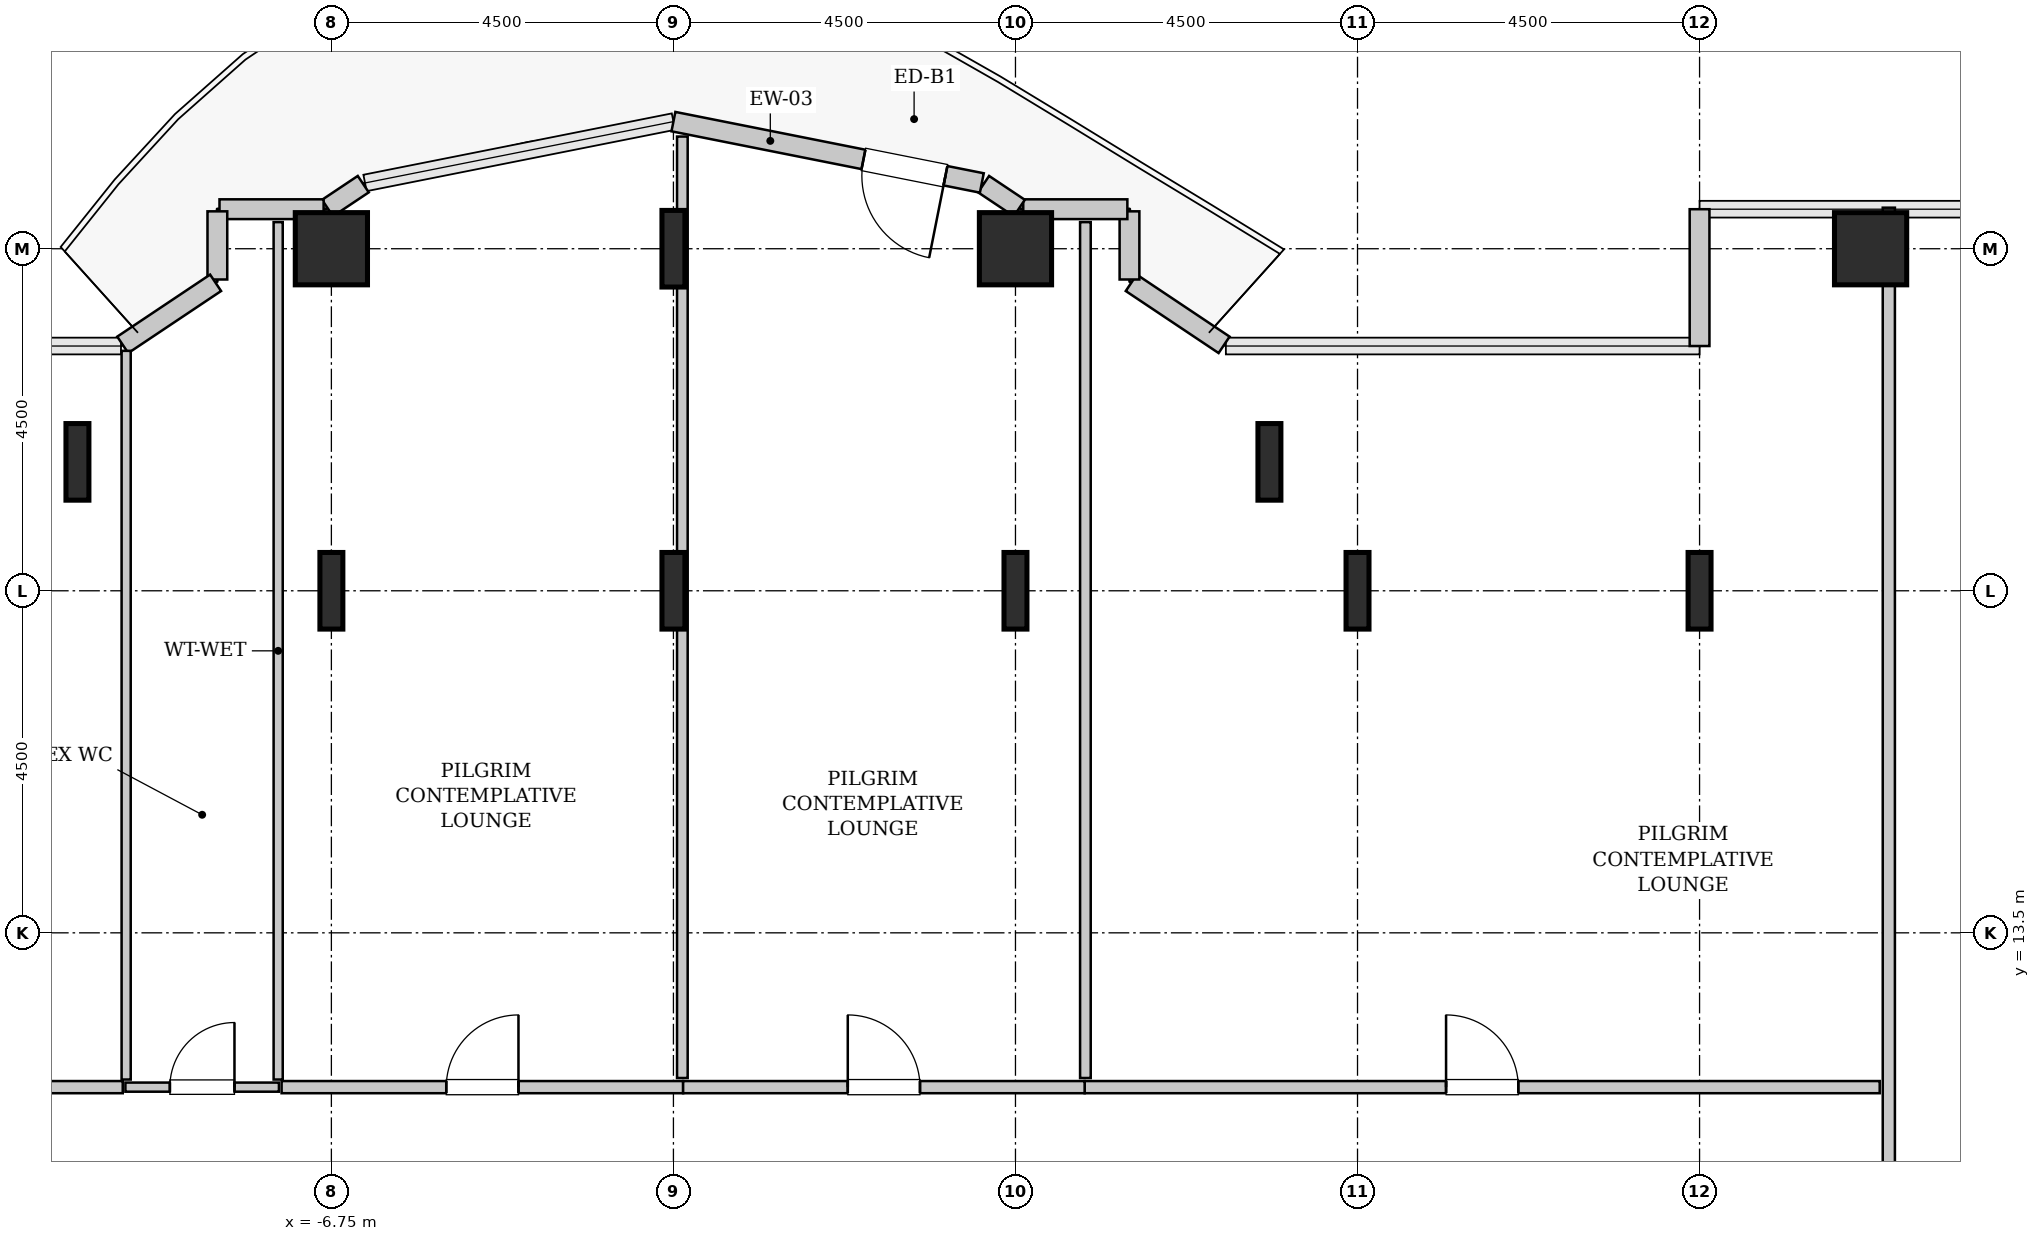
"""IFC4 building model, lengths in metres.
Left out: names, types, materials, properties, quantities, classifications, styles, units other than length and angle.
Written with IfcOpenShell. Run it as: python <this file> out.ifc"""

import sys

from ifc_helpers import new_model, si_unit, direction, frame, frame_2d, origin, origin_2d, place, context, subcontext, project, spatial, rectangle, hollow_rectangle, i_section, extrude, source, transform, mapped, element, fill, save


model = new_model("IFC4")
c1 = context("Model", 3, precision=1e-05, world=origin(), true_north=direction((0.0, 1.0)))
c2 = subcontext(c1, "Body", "Model", "MODEL_VIEW")
j1 = project(units=[si_unit("LENGTHUNIT", "METRE"), si_unit("PLANEANGLEUNIT", "RADIAN")], contexts=[c1])
p1 = place(None, origin())
s1 = spatial("IfcSite", under=j1, at=p1, CompositionType="ELEMENT")
p2 = place(p1, origin())
s2 = spatial("IfcBuilding", under=s1, at=p2, CompositionType="ELEMENT")
p3 = place(p2, frame((0.0, 0.0, 102.2)))
s3 = spatial("IfcBuildingStorey", under=s2, at=p3, CompositionType="ELEMENT", Elevation=102.2)
m1 = source(origin(), c2, "Body", "SweptSolid", [
    extrude(i_section(OverallWidth=0.302, OverallDepth=1.008, WebThickness=0.021, FlangeThickness=0.04, FilletRadius=0.03, at=origin_2d()), origin(), (0.0, 0.0, 1.0), 3.8),
])
for number, where, z_axis, x_axis in (
    (1, (-10.091, 19.696, 0.0), (0.0, 0.0, 1.0), (1.0, 0.0, 0.0)),
    (2, (-6.75, 18.0, 0.0), (0.0, 0.0, 1.0), (1.0, 0.0, 0.0)),
):
    element("IfcColumn", number, at=place(p3, frame(where, z_axis=z_axis, x_axis=x_axis)), inside=s3, PredefinedType="COLUMN", context=c2, shape_type="MappedRepresentation", body=[
        mapped(m1, transform((0.0, 0.0, 0.0), x_axis=(1.0, 0.0, 0.0), y_axis=(0.0, 1.0, 0.0), z_axis=(0.0, 0.0, 1.0), scale=1.0)),
    ])
m2 = source(origin(), c2, "Body", "SweptSolid", [
    extrude(hollow_rectangle(XDim=0.95, YDim=0.95, WallThickness=0.045, InnerFilletRadius=0.045, OuterFilletRadius=0.09, at=origin_2d()), origin(), (0.0, 0.0, 1.0), 3.8),
])
p4 = place(p3, frame((-6.75, 22.5, 0.0), z_axis=(0.0, 0.0, 1.0), x_axis=(1.0, 0.0, 0.0)))
e3 = element("IfcColumn", 3, at=p4, inside=s3, PredefinedType="COLUMN", context=c2, shape_type="MappedRepresentation", body=[
    mapped(m2, transform((0.0, 0.0, 0.0), x_axis=(1.0, 0.0, 0.0), y_axis=(0.0, 1.0, 0.0), z_axis=(0.0, 0.0, 1.0), scale=1.0)),
])
for number, where, z_axis, x_axis in (
    (4, (-2.25, 18.0, 0.0), (0.0, 0.0, 1.0), (1.0, 0.0, 0.0)),
    (5, (-2.25, 22.5, 0.0), (0.0, 0.0, 1.0), (1.0, 0.0, 0.0)),
    (6, (2.25, 18.0, 0.0), (0.0, 0.0, 1.0), (1.0, 0.0, 0.0)),
):
    element("IfcColumn", number, at=place(p3, frame(where, z_axis=z_axis, x_axis=x_axis)), inside=s3, PredefinedType="COLUMN", context=c2, shape_type="MappedRepresentation", body=[
        mapped(m1, transform((0.0, 0.0, 0.0), x_axis=(1.0, 0.0, 0.0), y_axis=(0.0, 1.0, 0.0), z_axis=(0.0, 0.0, 1.0), scale=1.0)),
    ])
p5 = place(p3, frame((2.25, 22.5, 0.0), z_axis=(0.0, 0.0, 1.0), x_axis=(1.0, 0.0, 0.0)))
e7 = element("IfcColumn", 7, at=p5, inside=s3, PredefinedType="COLUMN", context=c2, shape_type="MappedRepresentation", body=[
    mapped(m2, transform((0.0, 0.0, 0.0), x_axis=(1.0, 0.0, 0.0), y_axis=(0.0, 1.0, 0.0), z_axis=(0.0, 0.0, 1.0), scale=1.0)),
])
for number, where, z_axis, x_axis in (
    (8, (5.591, 19.696, 0.0), (0.0, 0.0, 1.0), (1.0, 0.0, 0.0)),
    (9, (6.75, 18.0, 0.0), (0.0, 0.0, 1.0), (1.0, 0.0, 0.0)),
    (10, (11.25, 18.0, 0.0), (0.0, 0.0, 1.0), (1.0, 0.0, 0.0)),
):
    element("IfcColumn", number, at=place(p3, frame(where, z_axis=z_axis, x_axis=x_axis)), inside=s3, PredefinedType="COLUMN", context=c2, shape_type="MappedRepresentation", body=[
        mapped(m1, transform((0.0, 0.0, 0.0), x_axis=(1.0, 0.0, 0.0), y_axis=(0.0, 1.0, 0.0), z_axis=(0.0, 0.0, 1.0), scale=1.0)),
    ])
p6 = place(p3, frame((13.5, 22.5, 0.0), z_axis=(0.0, 0.0, 1.0), x_axis=(1.0, 0.0, 0.0)))
e11 = element("IfcColumn", 11, at=p6, inside=s3, PredefinedType="COLUMN", context=c2, shape_type="MappedRepresentation", body=[
    mapped(m2, transform((0.0, 0.0, 0.0), x_axis=(1.0, 0.0, 0.0), y_axis=(0.0, 1.0, 0.0), z_axis=(0.0, 0.0, 1.0), scale=1.0)),
])
m3 = source(origin(), c2, "Body", "SweptSolid", [
    extrude(rectangle(XDim=1.8, YDim=0.26, at=frame_2d((0.9, 0.0))), origin(), (0.0, 0.0, 1.0), 3.55),
])
p7 = place(p3, frame((11.25, 23.02, 0.0), z_axis=(0.0, 0.0, 1.0), x_axis=(0.0, -1.0, 0.0)))
e12 = element("IfcWall", 12, at=p7, inside=s3, PredefinedType="SOLIDWALL", context=c2, shape_type="MappedRepresentation", body=[
    mapped(m3, transform((0.0, 0.0, 0.0), x_axis=(1.0, 0.0, 0.0), y_axis=(0.0, 1.0, 0.0), z_axis=(0.0, 0.0, 1.0), scale=1.0)),
])
m4 = source(origin(), c2, "Body", "SweptSolid", [
    extrude(rectangle(XDim=1.469, YDim=0.26, at=frame_2d((0.734, 0.0))), origin(), (0.0, 0.0, 1.0), 3.55),
])
p8 = place(p3, frame((4.995, 21.236, 0.0), z_axis=(0.0, 0.0, 1.0), x_axis=(-0.831461760506, 0.555581983884, 0.0)))
e13 = element("IfcWall", 13, at=p8, inside=s3, PredefinedType="SOLIDWALL", context=c2, shape_type="MappedRepresentation", body=[
    mapped(m4, transform((0.0, 0.0, 0.0), x_axis=(1.0, 0.0, 0.0), y_axis=(0.0, 1.0, 0.0), z_axis=(0.0, 0.0, 1.0), scale=1.0)),
])
m5 = source(origin(), c2, "Body", "SweptSolid", [
    extrude(rectangle(XDim=0.897, YDim=0.26, at=frame_2d((0.448, 0.0))), origin(), (0.0, 0.0, 1.0), 3.55),
])
p9 = place(p3, frame((3.75, 22.095, 0.0), z_axis=(0.0, 0.0, 1.0), x_axis=(0.0, 1.0, 0.0)))
e14 = element("IfcWall", 14, at=p9, inside=s3, PredefinedType="SOLIDWALL", context=c2, shape_type="MappedRepresentation", body=[
    mapped(m5, transform((0.0, 0.0, 0.0), x_axis=(1.0, 0.0, 0.0), y_axis=(0.0, 1.0, 0.0), z_axis=(0.0, 0.0, 1.0), scale=1.0)),
])
m6 = source(origin(), c2, "Body", "SweptSolid", [
    extrude(rectangle(XDim=1.37, YDim=0.26, at=frame_2d((0.685, 0.0))), origin(), (0.0, 0.0, 1.0), 3.55),
])
p10 = place(p3, frame((3.722, 23.02, 0.0), z_axis=(0.0, 0.0, 1.0), x_axis=(-1.0, 0.0, 0.0)))
e15 = element("IfcWall", 15, at=p10, inside=s3, PredefinedType="SOLIDWALL", context=c2, shape_type="MappedRepresentation", body=[
    mapped(m6, transform((0.0, 0.0, 0.0), x_axis=(1.0, 0.0, 0.0), y_axis=(0.0, 1.0, 0.0), z_axis=(0.0, 0.0, 1.0), scale=1.0)),
])
m7 = source(origin(), c2, "Body", "SweptSolid", [
    extrude(rectangle(XDim=0.565, YDim=0.26, at=frame_2d((0.283, 0.0))), origin(), (0.0, 0.0, 1.0), 3.55),
])
p11 = place(p3, frame((2.301, 23.036, 0.0), z_axis=(0.0, 0.0, 1.0), x_axis=(-0.831651492666, 0.555297933317, 0.0)))
e16 = element("IfcWall", 16, at=p11, inside=s3, PredefinedType="SOLIDWALL", context=c2, shape_type="MappedRepresentation", body=[
    mapped(m7, transform((0.0, 0.0, 0.0), x_axis=(1.0, 0.0, 0.0), y_axis=(0.0, 1.0, 0.0), z_axis=(0.0, 0.0, 1.0), scale=1.0)),
])
m8 = source(origin(), c2, "Body", "SweptSolid", [
    extrude(rectangle(XDim=4.137, YDim=0.26, at=frame_2d((2.068, 0.0))), origin(), (0.0, 0.0, 1.0), 3.55),
])
p12 = place(p3, frame((1.807, 23.365, 0.0), z_axis=(0.0, 0.0, 1.0), x_axis=(-0.980782170794, 0.195105954428, 0.0)))
e17 = element("IfcWall", 17, at=p12, inside=s3, PredefinedType="SOLIDWALL", context=c2, shape_type="MappedRepresentation", body=[
    mapped(m8, transform((0.0, 0.0, 0.0), x_axis=(1.0, 0.0, 0.0), y_axis=(0.0, 1.0, 0.0), z_axis=(0.0, 0.0, 1.0), scale=1.0)),
])
p13 = place(p12, frame((0.488, 0.0, 0.0)))
e18 = element("IfcOpeningElement", 18, at=p13, cuts=e17, PredefinedType="OPENING", context=c2, shape_type="SweptSolid", body=[
    extrude(rectangle(XDim=1.1, YDim=2.2, at=frame_2d((0.55, 1.1))), frame((0.0, 0.14, 0.0), z_axis=(0.0, -1.0, 0.0), x_axis=(1.0, 0.0, 0.0)), (0.0, 0.0, 1.0), 0.28),
])
p14 = place(p3, frame((-6.331, 23.35, 0.0), z_axis=(0.0, 0.0, 1.0), x_axis=(-0.831651492666, -0.555297933317, 0.0)))
e19 = element("IfcWall", 19, at=p14, inside=s3, PredefinedType="SOLIDWALL", context=c2, shape_type="MappedRepresentation", body=[
    mapped(m7, transform((0.0, 0.0, 0.0), x_axis=(1.0, 0.0, 0.0), y_axis=(0.0, 1.0, 0.0), z_axis=(0.0, 0.0, 1.0), scale=1.0)),
])
p15 = place(p3, frame((-6.852, 23.02, 0.0), z_axis=(0.0, 0.0, 1.0), x_axis=(-1.0, 0.0, 0.0)))
e20 = element("IfcWall", 20, at=p15, inside=s3, PredefinedType="SOLIDWALL", context=c2, shape_type="MappedRepresentation", body=[
    mapped(m6, transform((0.0, 0.0, 0.0), x_axis=(1.0, 0.0, 0.0), y_axis=(0.0, 1.0, 0.0), z_axis=(0.0, 0.0, 1.0), scale=1.0)),
])
p16 = place(p3, frame((-8.25, 22.992, 0.0), z_axis=(0.0, 0.0, 1.0), x_axis=(0.0, -1.0, 0.0)))
e21 = element("IfcWall", 21, at=p16, inside=s3, PredefinedType="SOLIDWALL", context=c2, shape_type="MappedRepresentation", body=[
    mapped(m5, transform((0.0, 0.0, 0.0), x_axis=(1.0, 0.0, 0.0), y_axis=(0.0, 1.0, 0.0), z_axis=(0.0, 0.0, 1.0), scale=1.0)),
])
p17 = place(p3, frame((-8.273, 22.052, 0.0), z_axis=(0.0, 0.0, 1.0), x_axis=(-0.831461760506, -0.555581983884, 0.0)))
e22 = element("IfcWall", 22, at=p17, inside=s3, PredefinedType="SOLIDWALL", context=c2, shape_type="MappedRepresentation", body=[
    mapped(m4, transform((0.0, 0.0, 0.0), x_axis=(1.0, 0.0, 0.0), y_axis=(0.0, 1.0, 0.0), z_axis=(0.0, 0.0, 1.0), scale=1.0)),
])
m9 = source(origin(), c2, "Body", "SweptSolid", [
    extrude(rectangle(XDim=2.02, YDim=0.12, at=frame_2d((1.01, 0.0))), origin(), (0.0, 0.0, 1.0), 3.535),
])
p18 = place(p3, frame((-9.46, 11.47, 0.0), z_axis=(0.0, 0.0, 1.0), x_axis=(1.0, 0.0, 0.0)))
e23 = element("IfcWall", 23, at=p18, inside=s3, PredefinedType="PLUMBINGWALL", context=c2, shape_type="MappedRepresentation", body=[
    mapped(m9, transform((0.0, 0.0, 0.0), x_axis=(1.0, 0.0, 0.0), y_axis=(0.0, 1.0, 0.0), z_axis=(0.0, 0.0, 1.0), scale=1.0)),
])
p19 = place(p18, frame((0.585, 0.0, 0.0)))
e24 = element("IfcOpeningElement", 24, at=p19, cuts=e23, PredefinedType="OPENING", context=c2, shape_type="SweptSolid", body=[
    extrude(rectangle(XDim=0.85, YDim=2.1, at=frame_2d((0.425, 1.05))), frame((0.0, 0.07, 0.0), z_axis=(0.0, -1.0, 0.0), x_axis=(1.0, 0.0, 0.0)), (0.0, 0.0, 1.0), 0.14),
])
m10 = source(origin(), c2, "Body", "SweptSolid", [
    extrude(rectangle(XDim=11.28, YDim=0.12, at=frame_2d((5.64, 0.0))), origin(), (0.0, 0.0, 1.0), 3.535),
])
p20 = place(p3, frame((-7.45, 11.57, 0.0), z_axis=(0.0, 0.0, 1.0), x_axis=(0.0, 1.0, 0.0)))
e25 = element("IfcWall", 25, at=p20, inside=s3, PredefinedType="PLUMBINGWALL", context=c2, shape_type="MappedRepresentation", body=[
    mapped(m10, transform((0.0, 0.0, 0.0), x_axis=(1.0, 0.0, 0.0), y_axis=(0.0, 1.0, 0.0), z_axis=(0.0, 0.0, 1.0), scale=1.0)),
])
m11 = source(origin(), c2, "Body", "SweptSolid", [
    extrude(rectangle(XDim=9.587, YDim=0.12, at=frame_2d((4.793, 0.0))), origin(), (0.0, 0.0, 1.0), 3.535),
])
p21 = place(p3, frame((-9.45, 11.57, 0.0), z_axis=(0.0, 0.0, 1.0), x_axis=(0.0, 1.0, 0.0)))
e26 = element("IfcWall", 26, at=p21, inside=s3, PredefinedType="PLUMBINGWALL", context=c2, shape_type="MappedRepresentation", body=[
    mapped(m11, transform((0.0, 0.0, 0.0), x_axis=(1.0, 0.0, 0.0), y_axis=(0.0, 1.0, 0.0), z_axis=(0.0, 0.0, 1.0), scale=1.0)),
])
m12 = source(origin(), c2, "Body", "SweptSolid", [
    extrude(rectangle(XDim=19.445, YDim=0.16, at=frame_2d((9.723, 0.0))), origin(), (0.0, 0.0, 1.0), 3.535),
])
p22 = place(p3, frame((13.74, 3.595, 0.0), z_axis=(0.0, 0.0, 1.0), x_axis=(0.0, 1.0, 0.0)))
e27 = element("IfcWall", 27, at=p22, inside=s3, PredefinedType="PARTITIONING", context=c2, shape_type="MappedRepresentation", body=[
    mapped(m12, transform((0.0, 0.0, 0.0), x_axis=(1.0, 0.0, 0.0), y_axis=(0.0, 1.0, 0.0), z_axis=(0.0, 0.0, 1.0), scale=1.0)),
])
p23 = place(p22, frame((3.482, 0.0, 0.0)))
e28 = element("IfcOpeningElement", 28, at=p23, cuts=e27, PredefinedType="OPENING", context=c2, shape_type="SweptSolid", body=[
    extrude(rectangle(XDim=0.95, YDim=2.1, at=frame_2d((0.475, 1.05))), frame((0.0, 0.09, 0.0), z_axis=(0.0, -1.0, 0.0), x_axis=(1.0, 0.0, 0.0)), (0.0, 0.0, 1.0), 0.18),
])
m13 = source(origin(), c2, "Body", "SweptSolid", [
    extrude(rectangle(XDim=4.125, YDim=0.16, at=frame_2d((2.062, 0.0))), origin(), (0.0, 0.0, 1.0), 3.535),
])
p24 = place(p3, frame((-13.62, 11.47, 0.0), z_axis=(0.0, 0.0, 1.0), x_axis=(1.0, 0.0, 0.0)))
e29 = element("IfcWall", 29, at=p24, inside=s3, PredefinedType="PARTITIONING", context=c2, shape_type="MappedRepresentation", body=[
    mapped(m13, transform((0.0, 0.0, 0.0), x_axis=(1.0, 0.0, 0.0), y_axis=(0.0, 1.0, 0.0), z_axis=(0.0, 0.0, 1.0), scale=1.0)),
])
p25 = place(p24, frame((1.587, 0.0, 0.0)))
e30 = element("IfcOpeningElement", 30, at=p25, cuts=e29, PredefinedType="OPENING", context=c2, shape_type="SweptSolid", body=[
    extrude(rectangle(XDim=0.95, YDim=2.1, at=frame_2d((0.475, 1.05))), frame((0.0, 0.09, 0.0), z_axis=(0.0, -1.0, 0.0), x_axis=(1.0, 0.0, 0.0)), (0.0, 0.0, 1.0), 0.18),
])
m14 = source(origin(), c2, "Body", "SweptSolid", [
    extrude(rectangle(XDim=10.46, YDim=0.16, at=frame_2d((5.23, 0.0))), origin(), (0.0, 0.0, 1.0), 3.535),
])
p26 = place(p3, frame((3.16, 11.47, 0.0), z_axis=(0.0, 0.0, 1.0), x_axis=(1.0, 0.0, 0.0)))
e31 = element("IfcWall", 31, at=p26, inside=s3, PredefinedType="PARTITIONING", context=c2, shape_type="MappedRepresentation", body=[
    mapped(m14, transform((0.0, 0.0, 0.0), x_axis=(1.0, 0.0, 0.0), y_axis=(0.0, 1.0, 0.0), z_axis=(0.0, 0.0, 1.0), scale=1.0)),
])
p27 = place(p26, frame((4.755, 0.0, 0.0)))
e32 = element("IfcOpeningElement", 32, at=p27, cuts=e31, PredefinedType="OPENING", context=c2, shape_type="SweptSolid", body=[
    extrude(rectangle(XDim=0.95, YDim=2.1, at=frame_2d((0.475, 1.05))), frame((0.0, 0.09, 0.0), z_axis=(0.0, -1.0, 0.0), x_axis=(1.0, 0.0, 0.0)), (0.0, 0.0, 1.0), 0.18),
])
m15 = source(origin(), c2, "Body", "SweptSolid", [
    extrude(rectangle(XDim=11.26, YDim=0.14, at=frame_2d((5.63, 0.0))), origin(), (0.0, 0.0, 1.0), 3.535),
])
p28 = place(p3, frame((3.17, 11.59, 0.0), z_axis=(0.0, 0.0, 1.0), x_axis=(0.0, 1.0, 0.0)))
e33 = element("IfcWall", 33, at=p28, inside=s3, PredefinedType="PARTITIONING", context=c2, shape_type="MappedRepresentation", body=[
    mapped(m15, transform((0.0, 0.0, 0.0), x_axis=(1.0, 0.0, 0.0), y_axis=(0.0, 1.0, 0.0), z_axis=(0.0, 0.0, 1.0), scale=1.0)),
])
m16 = source(origin(), c2, "Body", "SweptSolid", [
    extrude(rectangle(XDim=5.282, YDim=0.16, at=frame_2d((2.641, 0.0))), origin(), (0.0, 0.0, 1.0), 3.535),
])
p29 = place(p3, frame((-7.405, 11.47, 0.0), z_axis=(0.0, 0.0, 1.0), x_axis=(1.0, 0.0, 0.0)))
e34 = element("IfcWall", 34, at=p29, inside=s3, PredefinedType="PARTITIONING", context=c2, shape_type="MappedRepresentation", body=[
    mapped(m16, transform((0.0, 0.0, 0.0), x_axis=(1.0, 0.0, 0.0), y_axis=(0.0, 1.0, 0.0), z_axis=(0.0, 0.0, 1.0), scale=1.0)),
])
p30 = place(p29, frame((2.166, 0.0, 0.0)))
e35 = element("IfcOpeningElement", 35, at=p30, cuts=e34, PredefinedType="OPENING", context=c2, shape_type="SweptSolid", body=[
    extrude(rectangle(XDim=0.95, YDim=2.1, at=frame_2d((0.475, 1.05))), frame((0.0, 0.09, 0.0), z_axis=(0.0, -1.0, 0.0), x_axis=(1.0, 0.0, 0.0)), (0.0, 0.0, 1.0), 0.18),
])
m17 = source(origin(), c2, "Body", "SweptSolid", [
    extrude(rectangle(XDim=12.386, YDim=0.14, at=frame_2d((6.193, 0.0))), origin(), (0.0, 0.0, 1.0), 2.825),
])
p31 = place(p3, frame((-2.133, 11.59, 0.0), z_axis=(0.0, 0.0, 1.0), x_axis=(0.0, 1.0, 0.0)))
e36 = element("IfcWall", 36, at=p31, inside=s3, PredefinedType="PARTITIONING", context=c2, shape_type="MappedRepresentation", body=[
    mapped(m17, transform((0.0, 0.0, 0.0), x_axis=(1.0, 0.0, 0.0), y_axis=(0.0, 1.0, 0.0), z_axis=(0.0, 0.0, 1.0), scale=1.0)),
])
p32 = place(p3, frame((-2.123, 11.47, 0.0), z_axis=(0.0, 0.0, 1.0), x_axis=(1.0, 0.0, 0.0)))
e37 = element("IfcWall", 37, at=p32, inside=s3, PredefinedType="PARTITIONING", context=c2, shape_type="MappedRepresentation", body=[
    mapped(m16, transform((0.0, 0.0, 0.0), x_axis=(1.0, 0.0, 0.0), y_axis=(0.0, 1.0, 0.0), z_axis=(0.0, 0.0, 1.0), scale=1.0)),
])
p33 = place(p32, frame((2.166, 0.0, 0.0)))
e38 = element("IfcOpeningElement", 38, at=p33, cuts=e37, PredefinedType="OPENING", context=c2, shape_type="SweptSolid", body=[
    extrude(rectangle(XDim=0.95, YDim=2.1, at=frame_2d((0.475, 1.05))), frame((0.0, 0.09, 0.0), z_axis=(0.0, -1.0, 0.0), x_axis=(1.0, 0.0, 0.0)), (0.0, 0.0, 1.0), 0.18),
])
m18 = source(origin(), c2, "Body", "SweptSolid", [
    extrude(rectangle(XDim=1.1, YDim=2.2, at=frame_2d((0.55, 1.1))), frame((0.0, 0.025, 0.0), z_axis=(0.0, -1.0, 0.0), x_axis=(1.0, 0.0, 0.0)), (0.0, 0.0, 1.0), 0.05),
])
p34 = place(p13, origin())
e39 = element("IfcDoor", 39, at=p34, inside=s3, OperationType="SINGLE_SWING_LEFT", PredefinedType="DOOR", context=c2, shape_type="MappedRepresentation", body=[
    mapped(m18, transform((0.0, 0.0, 0.0), x_axis=(1.0, 0.0, 0.0), y_axis=(0.0, 1.0, 0.0), z_axis=(0.0, 0.0, 1.0), scale=1.0)),
])
fill(e18, e39)
m19 = source(origin(), c2, "Body", "SweptSolid", [
    extrude(rectangle(XDim=0.85, YDim=2.1, at=frame_2d((0.425, 1.05))), frame((0.0, 0.025, 0.0), z_axis=(0.0, -1.0, 0.0), x_axis=(1.0, 0.0, 0.0)), (0.0, 0.0, 1.0), 0.05),
])
p35 = place(p19, origin())
e40 = element("IfcDoor", 40, at=p35, inside=s3, OperationType="SINGLE_SWING_RIGHT", PredefinedType="DOOR", context=c2, shape_type="MappedRepresentation", body=[
    mapped(m19, transform((0.0, 0.0, 0.0), x_axis=(1.0, 0.0, 0.0), y_axis=(0.0, 1.0, 0.0), z_axis=(0.0, 0.0, 1.0), scale=1.0)),
])
fill(e24, e40)
m20 = source(origin(), c2, "Body", "SweptSolid", [
    extrude(rectangle(XDim=0.95, YDim=2.1, at=frame_2d((0.475, 1.05))), frame((0.0, 0.025, 0.0), z_axis=(0.0, -1.0, 0.0), x_axis=(1.0, 0.0, 0.0)), (0.0, 0.0, 1.0), 0.05),
])
p36 = place(p27, origin())
e41 = element("IfcDoor", 41, at=p36, inside=s3, OperationType="SINGLE_SWING_LEFT", PredefinedType="DOOR", context=c2, shape_type="MappedRepresentation", body=[
    mapped(m20, transform((0.0, 0.0, 0.0), x_axis=(1.0, 0.0, 0.0), y_axis=(0.0, 1.0, 0.0), z_axis=(0.0, 0.0, 1.0), scale=1.0)),
])
fill(e32, e41)
p37 = place(p30, origin())
e42 = element("IfcDoor", 42, at=p37, inside=s3, OperationType="SINGLE_SWING_RIGHT", PredefinedType="DOOR", context=c2, shape_type="MappedRepresentation", body=[
    mapped(m20, transform((0.0, 0.0, 0.0), x_axis=(1.0, 0.0, 0.0), y_axis=(0.0, 1.0, 0.0), z_axis=(0.0, 0.0, 1.0), scale=1.0)),
])
fill(e35, e42)
p38 = place(p33, origin())
e43 = element("IfcDoor", 43, at=p38, inside=s3, OperationType="SINGLE_SWING_LEFT", PredefinedType="DOOR", context=c2, shape_type="MappedRepresentation", body=[
    mapped(m20, transform((0.0, 0.0, 0.0), x_axis=(1.0, 0.0, 0.0), y_axis=(0.0, 1.0, 0.0), z_axis=(0.0, 0.0, 1.0), scale=1.0)),
])
fill(e38, e43)
save(model, sys.argv[1])
